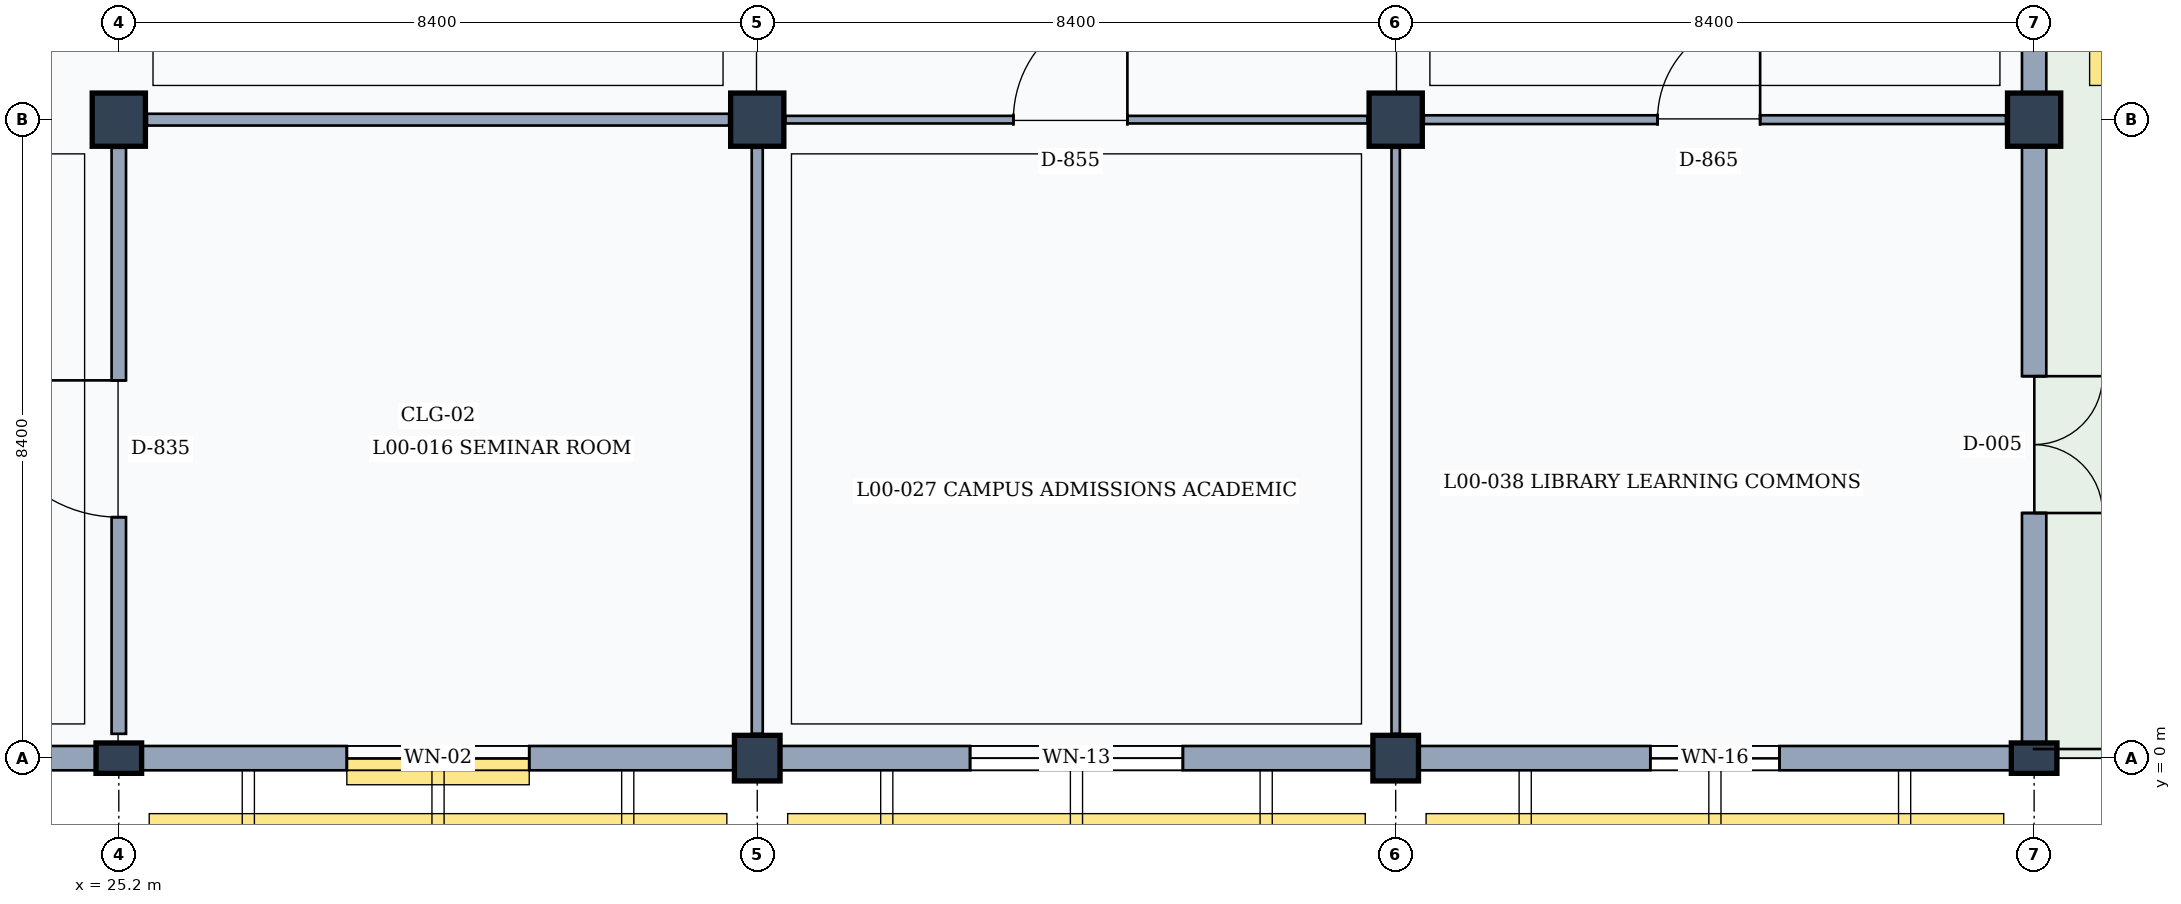
"""IFC4 building model, lengths in metres.
Left out: names, types, materials, properties, quantities, classifications, styles, units other than length and angle.
Written with IfcOpenShell. Run it as: python <this file> out.ifc"""

import sys

from ifc_helpers import new_model, si_unit, direction, frame, frame_2d, origin, origin_2d, place, context, subcontext, project, spatial, rectangle, extrude, element, fill, save


model = new_model("IFC4")
c1 = context("Model", 3, precision=1e-05, world=origin(), true_north=direction((0.0, 1.0)))
c2 = subcontext(c1, "Body", "Model", "MODEL_VIEW")
j1 = project(units=[si_unit("LENGTHUNIT", "METRE"), si_unit("PLANEANGLEUNIT", "RADIAN")], contexts=[c1])
p1 = place(None, origin())
s1 = spatial("IfcSite", under=j1, at=p1, CompositionType="ELEMENT")
p2 = place(p1, origin())
s2 = spatial("IfcBuilding", under=s1, at=p2, CompositionType="ELEMENT")
p3 = place(p2, origin())
s3 = spatial("IfcBuildingStorey", under=s2, at=p3, CompositionType="ELEMENT", Elevation=0.0)
p4 = place(p3, frame((25.2, 0.0, 0.0), z_axis=(0.0, 0.0, 1.0), x_axis=(1.0, 0.0, 0.0)))
e1 = element("IfcColumn", 1, at=p4, inside=s3, PredefinedType="PILASTER", context=c2, shape_type="SweptSolid", body=[
    extrude(rectangle(XDim=0.6, YDim=0.4, at=origin_2d()), origin(), (0.0, 0.0, 1.0), 4.8),
])
p5 = place(p3, frame((25.2, 8.4, 0.0), z_axis=(0.0, 0.0, 1.0), x_axis=(1.0, 0.0, 0.0)))
e2 = element("IfcColumn", 2, at=p5, inside=s3, PredefinedType="COLUMN", context=c2, shape_type="SweptSolid", body=[
    extrude(rectangle(XDim=0.7, YDim=0.7, at=origin_2d()), origin(), (0.0, 0.0, 1.0), 4.8),
])
p6 = place(p3, frame((33.6, 0.0, 0.0), z_axis=(0.0, 0.0, 1.0), x_axis=(1.0, 0.0, 0.0)))
e3 = element("IfcColumn", 3, at=p6, inside=s3, PredefinedType="COLUMN", context=c2, shape_type="SweptSolid", body=[
    extrude(rectangle(XDim=0.6, YDim=0.6, at=origin_2d()), origin(), (0.0, 0.0, 1.0), 4.8),
])
p7 = place(p3, frame((33.6, 8.4, 0.0), z_axis=(0.0, 0.0, 1.0), x_axis=(1.0, 0.0, 0.0)))
e4 = element("IfcColumn", 4, at=p7, inside=s3, PredefinedType="COLUMN", context=c2, shape_type="SweptSolid", body=[
    extrude(rectangle(XDim=0.7, YDim=0.7, at=origin_2d()), origin(), (0.0, 0.0, 1.0), 4.8),
])
p8 = place(p3, frame((42.0, 0.0, 0.0), z_axis=(0.0, 0.0, 1.0), x_axis=(1.0, 0.0, 0.0)))
e5 = element("IfcColumn", 5, at=p8, inside=s3, PredefinedType="COLUMN", context=c2, shape_type="SweptSolid", body=[
    extrude(rectangle(XDim=0.6, YDim=0.6, at=origin_2d()), origin(), (0.0, 0.0, 1.0), 4.8),
])
p9 = place(p3, frame((42.0, 8.4, 0.0), z_axis=(0.0, 0.0, 1.0), x_axis=(1.0, 0.0, 0.0)))
e6 = element("IfcColumn", 6, at=p9, inside=s3, PredefinedType="COLUMN", context=c2, shape_type="SweptSolid", body=[
    extrude(rectangle(XDim=0.7, YDim=0.7, at=origin_2d()), origin(), (0.0, 0.0, 1.0), 4.8),
])
p10 = place(p3, frame((50.4, 0.0, 0.0), z_axis=(0.0, 0.0, 1.0), x_axis=(1.0, 0.0, 0.0)))
e7 = element("IfcColumn", 7, at=p10, inside=s3, PredefinedType="PILASTER", context=c2, shape_type="SweptSolid", body=[
    extrude(rectangle(XDim=0.6, YDim=0.4, at=origin_2d()), origin(), (0.0, 0.0, 1.0), 4.8),
])
p11 = place(p3, frame((50.4, 8.4, 0.0), z_axis=(0.0, 0.0, 1.0), x_axis=(1.0, 0.0, 0.0)))
e8 = element("IfcColumn", 8, at=p11, inside=s3, PredefinedType="COLUMN", context=c2, shape_type="SweptSolid", body=[
    extrude(rectangle(XDim=0.7, YDim=0.7, at=origin_2d()), origin(), (0.0, 0.0, 1.0), 4.8),
])
p12 = place(p3, frame((24.9, 0.0, 0.0), z_axis=(0.0, 0.0, 1.0), x_axis=(-1.0, 0.0, 0.0)))
e9 = element("IfcWall", 9, at=p12, inside=s3, PredefinedType="SOLIDWALL", context=c2, shape_type="SweptSolid", body=[
    extrude(rectangle(XDim=7.8, YDim=0.32, at=frame_2d((3.9, 0.0))), origin(), (0.0, 0.0, 1.0), 3.96),
])
p13 = place(p12, frame((2.9, 0.0, 0.0)))
e10 = element("IfcOpeningElement", 10, at=p13, cuts=e9, PredefinedType="OPENING", context=c2, shape_type="SweptSolid", body=[
    extrude(rectangle(XDim=2.0, YDim=2.3, at=frame_2d((1.0, 1.15))), frame((0.0, 0.17, 0.0), z_axis=(0.0, -1.0, 0.0), x_axis=(1.0, 0.0, 0.0)), (0.0, 0.0, 1.0), 0.34),
])
p14 = place(p3, frame((33.3, 0.0, 0.0), z_axis=(0.0, 0.0, 1.0), x_axis=(-1.0, 0.0, 0.0)))
e11 = element("IfcWall", 11, at=p14, inside=s3, PredefinedType="SOLIDWALL", context=c2, shape_type="SweptSolid", body=[
    extrude(rectangle(XDim=7.8, YDim=0.32, at=frame_2d((3.9, 0.0))), origin(), (0.0, 0.0, 1.0), 3.96),
])
p15 = place(p14, frame((2.7, 0.0, 0.95)))
e12 = element("IfcOpeningElement", 12, at=p15, cuts=e11, PredefinedType="OPENING", context=c2, shape_type="SweptSolid", body=[
    extrude(rectangle(XDim=2.4, YDim=1.8, at=frame_2d((1.2, 0.9))), frame((0.0, 0.17, 0.0), z_axis=(0.0, -1.0, 0.0), x_axis=(1.0, 0.0, 0.0)), (0.0, 0.0, 1.0), 0.34),
])
p16 = place(p3, frame((41.7, 0.0, 0.0), z_axis=(0.0, 0.0, 1.0), x_axis=(-1.0, 0.0, 0.0)))
e13 = element("IfcWall", 13, at=p16, inside=s3, PredefinedType="SOLIDWALL", context=c2, shape_type="SweptSolid", body=[
    extrude(rectangle(XDim=7.8, YDim=0.32, at=frame_2d((3.9, 0.0))), origin(), (0.0, 0.0, 1.0), 3.96),
])
p17 = place(p16, frame((2.5, 0.0, 0.95)))
e14 = element("IfcOpeningElement", 14, at=p17, cuts=e13, PredefinedType="OPENING", context=c2, shape_type="SweptSolid", body=[
    extrude(rectangle(XDim=2.8, YDim=1.65, at=frame_2d((1.4, 0.825))), frame((0.0, 0.17, 0.0), z_axis=(0.0, -1.0, 0.0), x_axis=(1.0, 0.0, 0.0)), (0.0, 0.0, 1.0), 0.34),
])
p18 = place(p3, frame((50.1, 0.0, 0.0), z_axis=(0.0, 0.0, 1.0), x_axis=(-1.0, 0.0, 0.0)))
e15 = element("IfcWall", 15, at=p18, inside=s3, PredefinedType="SOLIDWALL", context=c2, shape_type="SweptSolid", body=[
    extrude(rectangle(XDim=7.8, YDim=0.32, at=frame_2d((3.9, 0.0))), origin(), (0.0, 0.0, 1.0), 3.96),
])
p19 = place(p18, frame((3.05, 0.0, 0.95)))
e16 = element("IfcOpeningElement", 16, at=p19, cuts=e15, PredefinedType="OPENING", context=c2, shape_type="SweptSolid", body=[
    extrude(rectangle(XDim=1.7, YDim=1.55, at=frame_2d((0.85, 0.775))), frame((0.0, 0.17, 0.0), z_axis=(0.0, -1.0, 0.0), x_axis=(1.0, 0.0, 0.0)), (0.0, 0.0, 1.0), 0.34),
])
p20 = place(p3, frame((50.4, 8.05, 0.0), z_axis=(0.0, 0.0, 1.0), x_axis=(0.0, -1.0, 0.0)))
e17 = element("IfcWall", 17, at=p20, inside=s3, PredefinedType="SOLIDWALL", context=c2, shape_type="SweptSolid", body=[
    extrude(rectangle(XDim=7.85, YDim=0.32, at=frame_2d((3.925, 0.0))), origin(), (0.0, 0.0, 1.0), 3.96),
])
p21 = place(p20, frame((3.025, 0.0, 0.0)))
e18 = element("IfcOpeningElement", 18, at=p21, cuts=e17, PredefinedType="OPENING", context=c2, shape_type="SweptSolid", body=[
    extrude(rectangle(XDim=1.8, YDim=2.2, at=frame_2d((0.9, 1.1))), frame((0.0, 0.17, 0.0), z_axis=(0.0, -1.0, 0.0), x_axis=(1.0, 0.0, 0.0)), (0.0, 0.0, 1.0), 0.34),
])
p22 = place(p3, frame((50.4, 16.45, 0.0), z_axis=(0.0, 0.0, 1.0), x_axis=(0.0, -1.0, 0.0)))
e19 = element("IfcWall", 19, at=p22, inside=s3, PredefinedType="SOLIDWALL", context=c2, shape_type="SweptSolid", body=[
    extrude(rectangle(XDim=7.7, YDim=0.32, at=frame_2d((3.85, 0.0))), origin(), (0.0, 0.0, 1.0), 3.96),
])
p23 = place(p22, frame((3.25, 0.0, 0.95)))
e20 = element("IfcOpeningElement", 20, at=p23, cuts=e19, PredefinedType="OPENING", context=c2, shape_type="SweptSolid", body=[
    extrude(rectangle(XDim=1.2, YDim=1.8, at=frame_2d((0.6, 0.9))), frame((0.0, 0.17, 0.0), z_axis=(0.0, -1.0, 0.0), x_axis=(1.0, 0.0, 0.0)), (0.0, 0.0, 1.0), 0.34),
])
p24 = place(p3, frame((25.2, 0.32, 0.0), z_axis=(0.0, 0.0, 1.0), x_axis=(0.0, 1.0, 0.0)))
e21 = element("IfcWall", 21, at=p24, inside=s3, PredefinedType="PARTITIONING", context=c2, shape_type="SweptSolid", body=[
    extrude(rectangle(XDim=7.71, YDim=0.19, at=frame_2d((3.855, 0.0))), origin(), (0.0, 0.0, 1.0), 3.92),
])
p25 = place(p24, frame((2.85, 0.0, 0.0)))
e22 = element("IfcOpeningElement", 22, at=p25, cuts=e21, PredefinedType="OPENING", context=c2, shape_type="SweptSolid", body=[
    extrude(rectangle(XDim=1.8, YDim=2.3, at=frame_2d((0.9, 1.15))), frame((0.0, 0.105, 0.0), z_axis=(0.0, -1.0, 0.0), x_axis=(1.0, 0.0, 0.0)), (0.0, 0.0, 1.0), 0.21),
])
p26 = place(p3, frame((33.6, 0.32, 0.0), z_axis=(0.0, 0.0, 1.0), x_axis=(0.0, 1.0, 0.0)))
e23 = element("IfcWall", 23, at=p26, inside=s3, PredefinedType="PARTITIONING", context=c2, shape_type="SweptSolid", body=[
    extrude(rectangle(XDim=7.71, YDim=0.145, at=frame_2d((3.855, 0.0))), origin(), (0.0, 0.0, 1.0), 3.92),
])
p27 = place(p3, frame((25.57, 8.4, 0.0), z_axis=(0.0, 0.0, 1.0), x_axis=(1.0, 0.0, 0.0)))
e24 = element("IfcWall", 24, at=p27, inside=s3, PredefinedType="PARTITIONING", context=c2, shape_type="SweptSolid", body=[
    extrude(rectangle(XDim=7.66, YDim=0.155, at=frame_2d((3.83, 0.0))), origin(), (0.0, 0.0, 1.0), 3.86),
])
p28 = place(p3, frame((42.0, 0.32, 0.0), z_axis=(0.0, 0.0, 1.0), x_axis=(0.0, 1.0, 0.0)))
e25 = element("IfcWall", 25, at=p28, inside=s3, PredefinedType="PARTITIONING", context=c2, shape_type="SweptSolid", body=[
    extrude(rectangle(XDim=7.71, YDim=0.11, at=frame_2d((3.855, 0.0))), origin(), (0.0, 0.0, 1.0), 3.92),
])
p29 = place(p3, frame((33.97, 8.4, 0.0), z_axis=(0.0, 0.0, 1.0), x_axis=(1.0, 0.0, 0.0)))
e26 = element("IfcWall", 26, at=p29, inside=s3, PredefinedType="MOVABLE", context=c2, shape_type="SweptSolid", body=[
    extrude(rectangle(XDim=7.66, YDim=0.1, at=frame_2d((3.83, 0.0))), origin(), (0.0, 0.0, 1.0), 3.86),
])
p30 = place(p29, frame((3.0, 0.0, 0.0)))
e27 = element("IfcOpeningElement", 27, at=p30, cuts=e26, PredefinedType="OPENING", context=c2, shape_type="SweptSolid", body=[
    extrude(rectangle(XDim=1.5, YDim=2.3, at=frame_2d((0.75, 1.15))), frame((0.0, 0.06, 0.0), z_axis=(0.0, -1.0, 0.0), x_axis=(1.0, 0.0, 0.0)), (0.0, 0.0, 1.0), 0.12),
])
p31 = place(p3, frame((42.37, 8.4, 0.0), z_axis=(0.0, 0.0, 1.0), x_axis=(1.0, 0.0, 0.0)))
e28 = element("IfcWall", 28, at=p31, inside=s3, PredefinedType="PARTITIONING", context=c2, shape_type="SweptSolid", body=[
    extrude(rectangle(XDim=7.66, YDim=0.115, at=frame_2d((3.83, 0.0))), origin(), (0.0, 0.0, 1.0), 3.86),
])
p32 = place(p31, frame((3.075, 0.0, 0.0)))
e29 = element("IfcOpeningElement", 29, at=p32, cuts=e28, PredefinedType="OPENING", context=c2, shape_type="SweptSolid", body=[
    extrude(rectangle(XDim=1.35, YDim=2.25, at=frame_2d((0.675, 1.125))), frame((0.0, 0.067, 0.0), z_axis=(0.0, -1.0, 0.0), x_axis=(1.0, 0.0, 0.0)), (0.0, 0.0, 1.0), 0.135),
])
p33 = place(p15, origin())
e30 = element("IfcWindow", 30, at=p33, inside=s3, PartitioningType="SINGLE_PANEL", PredefinedType="WINDOW", context=c2, shape_type="SweptSolid", body=[
    extrude(rectangle(XDim=2.4, YDim=1.8, at=frame_2d((1.2, 0.9))), frame((0.0, 0.03, 0.0), z_axis=(0.0, -1.0, 0.0), x_axis=(1.0, 0.0, 0.0)), (0.0, 0.0, 1.0), 0.06),
])
fill(e12, e30)
p34 = place(p17, origin())
e31 = element("IfcWindow", 31, at=p34, inside=s3, PartitioningType="SINGLE_PANEL", PredefinedType="WINDOW", context=c2, shape_type="SweptSolid", body=[
    extrude(rectangle(XDim=2.8, YDim=1.65, at=frame_2d((1.4, 0.825))), frame((0.0, 0.03, 0.0), z_axis=(0.0, -1.0, 0.0), x_axis=(1.0, 0.0, 0.0)), (0.0, 0.0, 1.0), 0.06),
])
fill(e14, e31)
p35 = place(p19, origin())
e32 = element("IfcWindow", 32, at=p35, inside=s3, PartitioningType="SINGLE_PANEL", PredefinedType="WINDOW", context=c2, shape_type="SweptSolid", body=[
    extrude(rectangle(XDim=1.7, YDim=1.55, at=frame_2d((0.85, 0.775))), frame((0.0, 0.03, 0.0), z_axis=(0.0, -1.0, 0.0), x_axis=(1.0, 0.0, 0.0)), (0.0, 0.0, 1.0), 0.06),
])
fill(e16, e32)
p36 = place(p21, origin())
e33 = element("IfcDoor", 33, at=p36, inside=s3, OperationType="DOUBLE_DOOR_SINGLE_SWING", PredefinedType="DOOR", context=c2, shape_type="SweptSolid", body=[
    extrude(rectangle(XDim=1.8, YDim=2.2, at=frame_2d((0.9, 1.1))), frame((0.0, 0.025, 0.0), z_axis=(0.0, -1.0, 0.0), x_axis=(1.0, 0.0, 0.0)), (0.0, 0.0, 1.0), 0.05),
])
fill(e18, e33)
p37 = place(p25, origin())
e34 = element("IfcDoor", 34, at=p37, inside=s3, OperationType="SINGLE_SWING_RIGHT", PredefinedType="DOOR", context=c2, shape_type="SweptSolid", body=[
    extrude(rectangle(XDim=1.8, YDim=2.3, at=frame_2d((0.9, 1.15))), frame((0.0, 0.025, 0.0), z_axis=(0.0, -1.0, 0.0), x_axis=(1.0, 0.0, 0.0)), (0.0, 0.0, 1.0), 0.05),
])
fill(e22, e34)
p38 = place(p30, origin())
e35 = element("IfcDoor", 35, at=p38, inside=s3, OperationType="SINGLE_SWING_RIGHT", PredefinedType="DOOR", context=c2, shape_type="SweptSolid", body=[
    extrude(rectangle(XDim=1.5, YDim=2.3, at=frame_2d((0.75, 1.15))), frame((0.0, 0.025, 0.0), z_axis=(0.0, -1.0, 0.0), x_axis=(1.0, 0.0, 0.0)), (0.0, 0.0, 1.0), 0.05),
])
fill(e27, e35)
p39 = place(p32, origin())
e36 = element("IfcDoor", 36, at=p39, inside=s3, OperationType="SINGLE_SWING_RIGHT", PredefinedType="DOOR", context=c2, shape_type="SweptSolid", body=[
    extrude(rectangle(XDim=1.35, YDim=2.25, at=frame_2d((0.675, 1.125))), frame((0.0, 0.025, 0.0), z_axis=(0.0, -1.0, 0.0), x_axis=(1.0, 0.0, 0.0)), (0.0, 0.0, 1.0), 0.05),
])
fill(e29, e36)
save(model, sys.argv[1])
